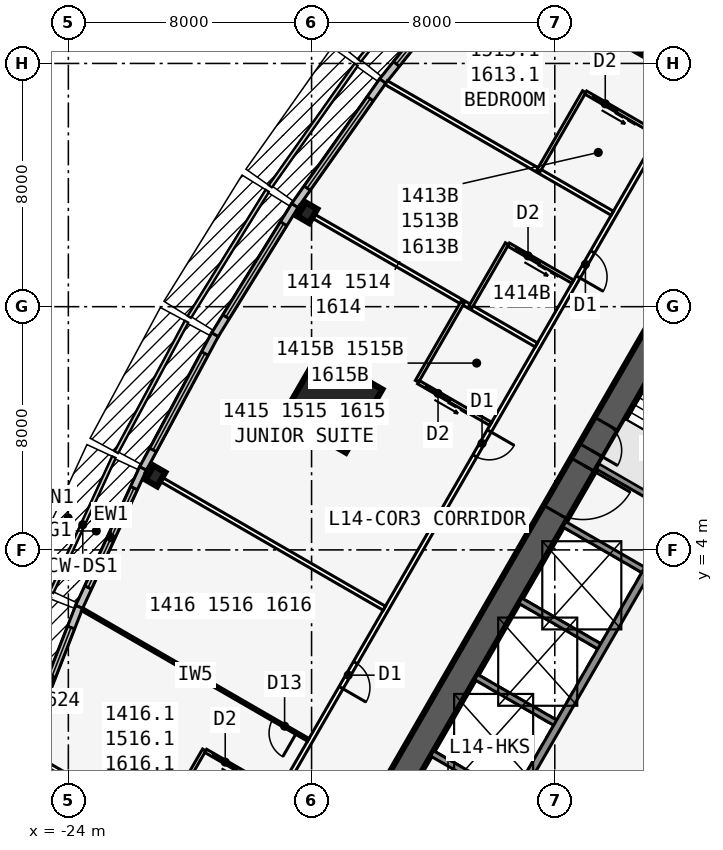
"""IFC4 building model, lengths in metres.
Left out: names, types, materials, properties, quantities, classifications, styles, units other than length and angle.
Written with IfcOpenShell. Run it as: python <this file> out.ifc"""

import sys

from ifc_helpers import new_model, si_unit, direction, frame, frame_2d, origin, origin_2d, place, context, subcontext, project, spatial, rectangle, i_section, extrude, element, fill, save


model = new_model("IFC4")
c1 = context("Model", 3, precision=1e-05, world=origin(), true_north=direction((0.0, 1.0)))
c2 = subcontext(c1, "Body", "Model", "MODEL_VIEW")
j1 = project(units=[si_unit("LENGTHUNIT", "METRE"), si_unit("PLANEANGLEUNIT", "RADIAN")], contexts=[c1])
p1 = place(None, origin())
s1 = spatial("IfcSite", under=j1, at=p1, CompositionType="ELEMENT")
p2 = place(p1, origin())
s2 = spatial("IfcBuilding", under=s1, at=p2, CompositionType="ELEMENT")
p3 = place(p2, frame((0.0, 0.0, 59.1)))
s3 = spatial("IfcBuildingStorey", under=s2, at=p3, CompositionType="ELEMENT", Elevation=59.1)
p4 = place(p3, frame((0.0, 19.052, 0.0), z_axis=(0.0, 0.0, 1.0), x_axis=(-0.499999749417, -0.866025548458, 0.0)))
e1 = element("IfcWall", 1, at=p4, inside=s3, PredefinedType="SHEAR", context=c2, shape_type="SweptSolid", body=[
    extrude(rectangle(XDim=33.0, YDim=0.9, at=frame_2d((16.5, 0.0))), origin(), (0.0, 0.0, 1.0), 3.4),
])
p5 = place(p4, frame((14.15, 0.0, 0.0)))
e2 = element("IfcOpeningElement", 2, at=p5, cuts=e1, PredefinedType="OPENING", context=c2, shape_type="SweptSolid", body=[
    extrude(rectangle(XDim=1.8, YDim=2.13, at=frame_2d((0.9, 1.065))), frame((0.0, 0.46, 0.0), z_axis=(0.0, -1.0, 0.0), x_axis=(1.0, 0.0, 0.0)), (0.0, 0.0, 1.0), 0.92),
])
p6 = place(p4, frame((12.6, 0.0, 0.0)))
e3 = element("IfcOpeningElement", 3, at=p6, cuts=e1, PredefinedType="OPENING", context=c2, shape_type="SweptSolid", body=[
    extrude(rectangle(XDim=1.0, YDim=2.13, at=frame_2d((0.5, 1.065))), frame((0.0, 0.46, 0.0), z_axis=(0.0, -1.0, 0.0), x_axis=(1.0, 0.0, 0.0)), (0.0, 0.0, 1.0), 0.92),
])
p7 = place(p3, frame((-4.929, 3.365, 0.0), z_axis=(0.0, 0.0, 1.0), x_axis=(-0.499991433582, -0.866030349552, 0.0)))
e4 = element("IfcWall", 4, at=p7, inside=s3, PredefinedType="SOLIDWALL", context=c2, shape_type="SweptSolid", body=[
    extrude(rectangle(XDim=10.633, YDim=0.25, at=frame_2d((5.316, 0.0))), origin(), (0.0, 0.0, 1.0), 3.235),
])
p8 = place(p7, frame((9.164, 0.0, 0.0)))
e5 = element("IfcOpeningElement", 5, at=p8, cuts=e4, PredefinedType="OPENING", context=c2, shape_type="SweptSolid", body=[
    extrude(rectangle(XDim=0.9, YDim=2.13, at=frame_2d((0.45, 1.065))), frame((0.0, 0.135, 0.0), z_axis=(0.0, -1.0, 0.0), x_axis=(1.0, 0.0, 0.0)), (0.0, 0.0, 1.0), 0.27),
])
for number, where, z_axis, x_axis in (
    (6, (-3.879, 5.184, 0.0), (0.0, 0.0, 1.0), (-0.866, 0.5, 0.0)),
    (7, (-4.979, 3.279, 0.0), (0.0, 0.0, 1.0), (-0.866, 0.5, 0.0)),
    (8, (-6.429, 0.767, 0.0), (0.0, 0.0, 1.0), (-0.866, 0.5, 0.0)),
    (9, (-7.879, -1.744, 0.0), (0.0, 0.0, 1.0), (-0.866, 0.5, 0.0)),
    (10, (-9.329, -4.256, 0.0), (0.0, 0.0, 1.0), (-0.866, 0.5, 0.0)),
):
    element("IfcWall", number, at=place(p3, frame(where, z_axis=z_axis, x_axis=x_axis)), inside=s3, PredefinedType="SOLIDWALL", context=c2, shape_type="SweptSolid", body=[
        extrude(rectangle(XDim=3.125, YDim=0.2, at=frame_2d((1.562, 0.0))), origin(), (0.0, 0.0, 1.0), 3.235),
    ])
for number, where, z_axis, x_axis in (
    (11, (-16.137, 15.09, 0.0), (0.0, 0.0, 1.0), (-0.866, 0.5, 0.0)),
    (12, (-21.137, 6.43, 0.0), (0.0, 0.0, 1.0), (-0.866, 0.5, 0.0)),
):
    element("IfcColumn", number, at=place(p3, frame(where, z_axis=z_axis, x_axis=x_axis)), inside=s3, PredefinedType="COLUMN", context=c2, shape_type="SweptSolid", body=[
        extrude(i_section(OverallWidth=0.442, OverallDepth=0.531, WebThickness=0.066, FlangeThickness=0.106, at=origin_2d()), origin(), (0.0, 0.0, 1.0), 3.4),
    ])
p9 = place(p3, frame((-15.312, 8.84, 0.0), z_axis=(0.0, 0.0, 1.0), x_axis=(-0.866025403784, 0.5, 0.0)))
e13 = element("IfcColumn", 13, at=p9, inside=s3, PredefinedType="COLUMN", context=c2, shape_type="SweptSolid", body=[
    extrude(rectangle(XDim=2.4, YDim=2.4, at=origin_2d()), origin(), (0.0, 0.0, 1.0), 3.4),
])
p10 = place(p3, frame((-10.505, 23.364, 0.0), z_axis=(0.0, 0.0, 1.0), x_axis=(-0.624594965756, -0.780948864364, 0.0)))
e14 = element("IfcWall", 14, at=p10, inside=s3, PredefinedType="STANDARD", context=c2, shape_type="SweptSolid", body=[
    extrude(rectangle(XDim=5.058, YDim=0.25, at=frame_2d((2.529, 0.0))), origin(), (0.0, 0.0, 1.0), 3.235),
])
p11 = place(p10, frame((0.729, 0.0, 0.45)))
e15 = element("IfcOpeningElement", 15, at=p11, cuts=e14, PredefinedType="OPENING", context=c2, shape_type="SweptSolid", body=[
    extrude(rectangle(XDim=3.6, YDim=2.4, at=frame_2d((1.8, 1.2))), frame((0.0, 0.135, 0.0), z_axis=(0.0, -1.0, 0.0), x_axis=(1.0, 0.0, 0.0)), (0.0, 0.0, 1.0), 0.27),
])
p12 = place(p3, frame((-13.659, 19.42, 0.0), z_axis=(0.0, 0.0, 1.0), x_axis=(-0.5766431066, -0.81699616132, 0.0)))
e16 = element("IfcWall", 16, at=p12, inside=s3, PredefinedType="STANDARD", context=c2, shape_type="SweptSolid", body=[
    extrude(rectangle(XDim=5.021, YDim=0.25, at=frame_2d((2.51, 0.0))), origin(), (0.0, 0.0, 1.0), 3.235),
])
p13 = place(p12, frame((0.71, 0.0, 0.45)))
e17 = element("IfcOpeningElement", 17, at=p13, cuts=e16, PredefinedType="OPENING", context=c2, shape_type="SweptSolid", body=[
    extrude(rectangle(XDim=3.6, YDim=2.4, at=frame_2d((1.8, 1.2))), frame((0.0, 0.135, 0.0), z_axis=(0.0, -1.0, 0.0), x_axis=(1.0, 0.0, 0.0)), (0.0, 0.0, 1.0), 0.27),
])
p14 = place(p3, frame((-16.551, 15.324, 0.0), z_axis=(0.0, 0.0, 1.0), x_axis=(-0.526132807704, -0.850402415717, 0.0)))
e18 = element("IfcWall", 18, at=p14, inside=s3, PredefinedType="STANDARD", context=c2, shape_type="SweptSolid", body=[
    extrude(rectangle(XDim=5.002, YDim=0.25, at=frame_2d((2.501, 0.0))), origin(), (0.0, 0.0, 1.0), 3.235),
])
p15 = place(p14, frame((0.701, 0.0, 0.45)))
e19 = element("IfcOpeningElement", 19, at=p15, cuts=e18, PredefinedType="OPENING", context=c2, shape_type="SweptSolid", body=[
    extrude(rectangle(XDim=3.6, YDim=2.4, at=frame_2d((1.8, 1.2))), frame((0.0, 0.135, 0.0), z_axis=(0.0, -1.0, 0.0), x_axis=(1.0, 0.0, 0.0)), (0.0, 0.0, 1.0), 0.27),
])
p16 = place(p3, frame((-19.178, 11.077, 0.0), z_axis=(0.0, 0.0, 1.0), x_axis=(-0.473412820489, -0.880840678782, 0.0)))
e20 = element("IfcWall", 20, at=p16, inside=s3, PredefinedType="STANDARD", context=c2, shape_type="SweptSolid", body=[
    extrude(rectangle(XDim=5.002, YDim=0.25, at=frame_2d((2.501, 0.0))), origin(), (0.0, 0.0, 1.0), 3.235),
])
p17 = place(p16, frame((0.701, 0.0, 0.45)))
e21 = element("IfcOpeningElement", 21, at=p17, cuts=e20, PredefinedType="OPENING", context=c2, shape_type="SweptSolid", body=[
    extrude(rectangle(XDim=3.6, YDim=2.4, at=frame_2d((1.8, 1.2))), frame((0.0, 0.135, 0.0), z_axis=(0.0, -1.0, 0.0), x_axis=(1.0, 0.0, 0.0)), (0.0, 0.0, 1.0), 0.27),
])
p18 = place(p3, frame((-21.543, 6.678, 0.0), z_axis=(0.0, 0.0, 1.0), x_axis=(-0.419203100754, -0.907892482796, 0.0)))
e22 = element("IfcWall", 22, at=p18, inside=s3, PredefinedType="STANDARD", context=c2, shape_type="SweptSolid", body=[
    extrude(rectangle(XDim=5.021, YDim=0.25, at=frame_2d((2.51, 0.0))), origin(), (0.0, 0.0, 1.0), 3.235),
])
p19 = place(p18, frame((0.71, 0.0, 0.45)))
e23 = element("IfcOpeningElement", 23, at=p19, cuts=e22, PredefinedType="OPENING", context=c2, shape_type="SweptSolid", body=[
    extrude(rectangle(XDim=3.6, YDim=2.4, at=frame_2d((1.8, 1.2))), frame((0.0, 0.135, 0.0), z_axis=(0.0, -1.0, 0.0), x_axis=(1.0, 0.0, 0.0)), (0.0, 0.0, 1.0), 0.27),
])
p20 = place(p3, frame((-23.645, 2.126, 0.0), z_axis=(0.0, 0.0, 1.0), x_axis=(-0.364013463868, -0.931393685894, 0.0)))
e24 = element("IfcWall", 24, at=p20, inside=s3, PredefinedType="STANDARD", context=c2, shape_type="SweptSolid", body=[
    extrude(rectangle(XDim=5.058, YDim=0.25, at=frame_2d((2.529, 0.0))), origin(), (0.0, 0.0, 1.0), 3.235),
])
p21 = place(p20, frame((0.729, 0.0, 0.45)))
e25 = element("IfcOpeningElement", 25, at=p21, cuts=e24, PredefinedType="OPENING", context=c2, shape_type="SweptSolid", body=[
    extrude(rectangle(XDim=3.6, YDim=2.4, at=frame_2d((1.8, 1.2))), frame((0.0, 0.135, 0.0), z_axis=(0.0, -1.0, 0.0), x_axis=(1.0, 0.0, 0.0)), (0.0, 0.0, 1.0), 0.27),
])
p22 = place(p3, frame((-0.5, 24.636, 0.0), z_axis=(0.0, 0.0, 1.0), x_axis=(-0.500001915564, -0.86602429783, 0.0)))
e26 = element("IfcWall", 26, at=p22, inside=s3, PredefinedType="PARTITIONING", context=c2, shape_type="SweptSolid", body=[
    extrude(rectangle(XDim=42.172, YDim=0.15, at=frame_2d((21.086, 0.0))), origin(), (0.0, 0.0, 1.0), 3.235),
])
p23 = place(p22, frame((2.338, 0.0, 0.0)))
e27 = element("IfcOpeningElement", 27, at=p23, cuts=e26, PredefinedType="OPENING", context=c2, shape_type="SweptSolid", body=[
    extrude(rectangle(XDim=0.95, YDim=2.13, at=frame_2d((0.475, 1.065))), frame((0.0, 0.085, 0.0), z_axis=(0.0, -1.0, 0.0), x_axis=(1.0, 0.0, 0.0)), (0.0, 0.0, 1.0), 0.17),
])
p24 = place(p22, frame((12.511, 0.0, 0.0)))
e28 = element("IfcOpeningElement", 28, at=p24, cuts=e26, PredefinedType="OPENING", context=c2, shape_type="SweptSolid", body=[
    extrude(rectangle(XDim=0.95, YDim=2.13, at=frame_2d((0.475, 1.065))), frame((0.0, 0.085, 0.0), z_axis=(0.0, -1.0, 0.0), x_axis=(1.0, 0.0, 0.0)), (0.0, 0.0, 1.0), 0.17),
])
p25 = place(p22, frame((19.311, 0.0, 0.0)))
e29 = element("IfcOpeningElement", 29, at=p25, cuts=e26, PredefinedType="OPENING", context=c2, shape_type="SweptSolid", body=[
    extrude(rectangle(XDim=0.95, YDim=2.13, at=frame_2d((0.475, 1.065))), frame((0.0, 0.085, 0.0), z_axis=(0.0, -1.0, 0.0), x_axis=(1.0, 0.0, 0.0)), (0.0, 0.0, 1.0), 0.17),
])
p26 = place(p22, frame((28.111, 0.0, 0.0)))
e30 = element("IfcOpeningElement", 30, at=p26, cuts=e26, PredefinedType="OPENING", context=c2, shape_type="SweptSolid", body=[
    extrude(rectangle(XDim=0.95, YDim=2.13, at=frame_2d((0.475, 1.065))), frame((0.0, 0.085, 0.0), z_axis=(0.0, -1.0, 0.0), x_axis=(1.0, 0.0, 0.0)), (0.0, 0.0, 1.0), 0.17),
])
p27 = place(p22, frame((39.311, 0.0, 0.0)))
e31 = element("IfcOpeningElement", 31, at=p27, cuts=e26, PredefinedType="OPENING", context=c2, shape_type="SweptSolid", body=[
    extrude(rectangle(XDim=0.95, YDim=2.13, at=frame_2d((0.475, 1.065))), frame((0.0, 0.085, 0.0), z_axis=(0.0, -1.0, 0.0), x_axis=(1.0, 0.0, 0.0)), (0.0, 0.0, 1.0), 0.17),
])
p28 = place(p3, frame((-3.608, 19.404, 0.0), z_axis=(0.0, 0.0, 1.0), x_axis=(-0.866021300503, 0.500007107024, 0.0)))
e32 = element("IfcWall", 32, at=p28, inside=s3, PredefinedType="PARTITIONING", context=c2, shape_type="SweptSolid", body=[
    extrude(rectangle(XDim=7.82, YDim=0.1, at=frame_2d((3.91, 0.0))), origin(), (0.0, 0.0, 1.0), 2.389),
])
p29 = place(p28, frame((0.45, 0.0, 0.0)))
e33 = element("IfcOpeningElement", 33, at=p29, cuts=e32, PredefinedType="OPENING", context=c2, shape_type="SweptSolid", body=[
    extrude(rectangle(XDim=0.9, YDim=2.13, at=frame_2d((0.45, 1.065))), frame((0.0, 0.06, 0.0), z_axis=(0.0, -1.0, 0.0), x_axis=(1.0, 0.0, 0.0)), (0.0, 0.0, 1.0), 0.12),
])
p30 = place(p3, frame((-6.108, 15.073, 0.0), z_axis=(0.0, 0.0, 1.0), x_axis=(-0.866031196456, 0.499989966665, 0.0)))
e34 = element("IfcWall", 34, at=p30, inside=s3, PredefinedType="PARTITIONING", context=c2, shape_type="SweptSolid", body=[
    extrude(rectangle(XDim=8.585, YDim=0.15, at=frame_2d((4.292, 0.0))), origin(), (0.0, 0.0, 1.0), 2.389),
])
for number, where, z_axis, x_axis in (
    (35, (-8.608, 10.743, 0.0), (0.0, 0.0, 1.0), (-0.866, 0.5, 0.0)),
    (36, (-13.608, 2.083, 0.0), (0.0, 0.0, 1.0), (-0.866, 0.5, 0.0)),
):
    element("IfcWall", number, at=place(p3, frame(where, z_axis=z_axis, x_axis=x_axis)), inside=s3, PredefinedType="PARTITIONING", context=c2, shape_type="SweptSolid", body=[
        extrude(rectangle(XDim=9.043, YDim=0.15, at=frame_2d((4.521, 0.0))), origin(), (0.0, 0.0, 1.0), 2.389),
    ])
p31 = place(p3, frame((-16.108, -2.247, 0.0), z_axis=(0.0, 0.0, 1.0), x_axis=(-0.866018881988, 0.500011295912, 0.0)))
e37 = element("IfcWall", 37, at=p31, inside=s3, PredefinedType="PARTITIONING", context=c2, shape_type="SweptSolid", body=[
    extrude(rectangle(XDim=8.585, YDim=0.1, at=frame_2d((4.292, 0.0))), origin(), (0.0, 0.0, 1.0), 2.389),
])
p32 = place(p31, frame((0.45, 0.0, 0.0)))
e38 = element("IfcOpeningElement", 38, at=p32, cuts=e37, PredefinedType="OPENING", context=c2, shape_type="SweptSolid", body=[
    extrude(rectangle(XDim=0.9, YDim=2.13, at=frame_2d((0.45, 1.065))), frame((0.0, 0.06, 0.0), z_axis=(0.0, -1.0, 0.0), x_axis=(1.0, 0.0, 0.0)), (0.0, 0.0, 1.0), 0.12),
])
p33 = place(p3, frame((-18.608, -6.577, 0.0), z_axis=(0.0, 0.0, 1.0), x_axis=(-0.866034818847, 0.499983692279, 0.0)))
e39 = element("IfcWall", 39, at=p33, inside=s3, PredefinedType="PARTITIONING", context=c2, shape_type="SweptSolid", body=[
    extrude(rectangle(XDim=7.82, YDim=0.15, at=frame_2d((3.91, 0.0))), origin(), (0.0, 0.0, 1.0), 2.389),
])
p34 = place(p3, frame((-7.033, 19.072, 0.0), z_axis=(0.0, 0.0, 1.0), x_axis=(-0.499990139034, -0.866031096941, 0.0)))
e40 = element("IfcWall", 40, at=p34, inside=s3, PredefinedType="PLUMBINGWALL", context=c2, shape_type="SweptSolid", body=[
    extrude(rectangle(XDim=3.0, YDim=0.12, at=frame_2d((1.5, 0.0))), origin(), (0.0, 0.0, 1.0), 3.235),
])
p35 = place(p3, frame((-4.608, 17.671, 0.0), z_axis=(0.0, 0.0, 1.0), x_axis=(-0.865997131366, 0.500048966069, 0.0)))
e41 = element("IfcWall", 41, at=p35, inside=s3, PredefinedType="PLUMBINGWALL", context=c2, shape_type="SweptSolid", body=[
    extrude(rectangle(XDim=2.74, YDim=0.12, at=frame_2d((1.37, 0.0))), origin(), (0.0, 0.0, 1.0), 3.235),
])
p36 = place(p35, frame((1.55, 0.0, 0.0)))
e42 = element("IfcOpeningElement", 42, at=p36, cuts=e41, PredefinedType="OPENING", context=c2, shape_type="SweptSolid", body=[
    extrude(rectangle(XDim=0.9, YDim=2.13, at=frame_2d((0.45, 1.065))), frame((0.0, 0.07, 0.0), z_axis=(0.0, -1.0, 0.0), x_axis=(1.0, 0.0, 0.0)), (0.0, 0.0, 1.0), 0.14),
])
p37 = place(p3, frame((-9.573, 14.072, 0.0), z_axis=(0.0, 0.0, 1.0), x_axis=(-0.500001309137, -0.866024647952, 0.0)))
e43 = element("IfcWall", 43, at=p37, inside=s3, PredefinedType="PLUMBINGWALL", context=c2, shape_type="SweptSolid", body=[
    extrude(rectangle(XDim=2.4, YDim=0.12, at=frame_2d((1.2, 0.0))), origin(), (0.0, 0.0, 1.0), 3.235),
])
p38 = place(p3, frame((-7.408, 12.822, 0.0), z_axis=(0.0, 0.0, 1.0), x_axis=(-0.866023955769, 0.500002508028, 0.0)))
e44 = element("IfcWall", 44, at=p38, inside=s3, PredefinedType="PLUMBINGWALL", context=c2, shape_type="SweptSolid", body=[
    extrude(rectangle(XDim=2.44, YDim=0.12, at=frame_2d((1.22, 0.0))), origin(), (0.0, 0.0, 1.0), 3.235),
])
p39 = place(p38, frame((1.25, 0.0, 0.0)))
e45 = element("IfcOpeningElement", 45, at=p39, cuts=e44, PredefinedType="OPENING", context=c2, shape_type="SweptSolid", body=[
    extrude(rectangle(XDim=0.9, YDim=2.13, at=frame_2d((0.45, 1.065))), frame((0.0, 0.07, 0.0), z_axis=(0.0, -1.0, 0.0), x_axis=(1.0, 0.0, 0.0)), (0.0, 0.0, 1.0), 0.14),
])
p40 = place(p3, frame((-11.033, 12.143, 0.0), z_axis=(0.0, 0.0, 1.0), x_axis=(-0.499990139034, -0.866031096941, 0.0)))
e46 = element("IfcWall", 46, at=p40, inside=s3, PredefinedType="PLUMBINGWALL", context=c2, shape_type="SweptSolid", body=[
    extrude(rectangle(XDim=3.0, YDim=0.12, at=frame_2d((1.5, 0.0))), origin(), (0.0, 0.0, 1.0), 3.235),
])
p41 = place(p3, frame((-10.108, 8.145, 0.0), z_axis=(0.0, 0.0, 1.0), x_axis=(-0.866035715982, 0.499982138324, 0.0)))
e47 = element("IfcWall", 47, at=p41, inside=s3, PredefinedType="PLUMBINGWALL", context=c2, shape_type="SweptSolid", body=[
    extrude(rectangle(XDim=2.74, YDim=0.12, at=frame_2d((1.37, 0.0))), origin(), (0.0, 0.0, 1.0), 3.235),
])
p42 = place(p41, frame((1.55, 0.0, 0.0)))
e48 = element("IfcOpeningElement", 48, at=p42, cuts=e47, PredefinedType="OPENING", context=c2, shape_type="SweptSolid", body=[
    extrude(rectangle(XDim=0.9, YDim=2.13, at=frame_2d((0.45, 1.065))), frame((0.0, 0.07, 0.0), z_axis=(0.0, -1.0, 0.0), x_axis=(1.0, 0.0, 0.0)), (0.0, 0.0, 1.0), 0.14),
])
p43 = place(p3, frame((-19.533, -2.579, 0.0), z_axis=(0.0, 0.0, 1.0), x_axis=(-0.499990139034, -0.866031096941, 0.0)))
e49 = element("IfcWall", 49, at=p43, inside=s3, PredefinedType="PLUMBINGWALL", context=c2, shape_type="SweptSolid", body=[
    extrude(rectangle(XDim=3.0, YDim=0.12, at=frame_2d((1.5, 0.0))), origin(), (0.0, 0.0, 1.0), 3.235),
])
p44 = place(p3, frame((-17.108, -3.979, 0.0), z_axis=(0.0, 0.0, 1.0), x_axis=(-0.865997131366, 0.500048966069, 0.0)))
e50 = element("IfcWall", 50, at=p44, inside=s3, PredefinedType="PLUMBINGWALL", context=c2, shape_type="SweptSolid", body=[
    extrude(rectangle(XDim=2.74, YDim=0.12, at=frame_2d((1.37, 0.0))), origin(), (0.0, 0.0, 1.0), 3.235),
])
p45 = place(p44, frame((1.55, 0.0, 0.0)))
e51 = element("IfcOpeningElement", 51, at=p45, cuts=e50, PredefinedType="OPENING", context=c2, shape_type="SweptSolid", body=[
    extrude(rectangle(XDim=0.9, YDim=2.13, at=frame_2d((0.45, 1.065))), frame((0.0, 0.07, 0.0), z_axis=(0.0, -1.0, 0.0), x_axis=(1.0, 0.0, 0.0)), (0.0, 0.0, 1.0), 0.14),
])
p46 = place(p11, origin())
e52 = element("IfcWindow", 52, at=p46, inside=s3, PartitioningType="SINGLE_PANEL", PredefinedType="WINDOW", context=c2, shape_type="SweptSolid", body=[
    extrude(rectangle(XDim=3.6, YDim=2.4, at=frame_2d((1.8, 1.2))), frame((0.0, 0.03, 0.0), z_axis=(0.0, -1.0, 0.0), x_axis=(1.0, 0.0, 0.0)), (0.0, 0.0, 1.0), 0.06),
])
fill(e15, e52)
p47 = place(p13, origin())
e53 = element("IfcWindow", 53, at=p47, inside=s3, PartitioningType="SINGLE_PANEL", PredefinedType="WINDOW", context=c2, shape_type="SweptSolid", body=[
    extrude(rectangle(XDim=3.6, YDim=2.4, at=frame_2d((1.8, 1.2))), frame((0.0, 0.03, 0.0), z_axis=(0.0, -1.0, 0.0), x_axis=(1.0, 0.0, 0.0)), (0.0, 0.0, 1.0), 0.06),
])
fill(e17, e53)
p48 = place(p15, origin())
e54 = element("IfcWindow", 54, at=p48, inside=s3, PartitioningType="SINGLE_PANEL", PredefinedType="WINDOW", context=c2, shape_type="SweptSolid", body=[
    extrude(rectangle(XDim=3.6, YDim=2.4, at=frame_2d((1.8, 1.2))), frame((0.0, 0.03, 0.0), z_axis=(0.0, -1.0, 0.0), x_axis=(1.0, 0.0, 0.0)), (0.0, 0.0, 1.0), 0.06),
])
fill(e19, e54)
p49 = place(p17, origin())
e55 = element("IfcWindow", 55, at=p49, inside=s3, PartitioningType="SINGLE_PANEL", PredefinedType="WINDOW", context=c2, shape_type="SweptSolid", body=[
    extrude(rectangle(XDim=3.6, YDim=2.4, at=frame_2d((1.8, 1.2))), frame((0.0, 0.03, 0.0), z_axis=(0.0, -1.0, 0.0), x_axis=(1.0, 0.0, 0.0)), (0.0, 0.0, 1.0), 0.06),
])
fill(e21, e55)
p50 = place(p19, origin())
e56 = element("IfcWindow", 56, at=p50, inside=s3, PartitioningType="SINGLE_PANEL", PredefinedType="WINDOW", context=c2, shape_type="SweptSolid", body=[
    extrude(rectangle(XDim=3.6, YDim=2.4, at=frame_2d((1.8, 1.2))), frame((0.0, 0.03, 0.0), z_axis=(0.0, -1.0, 0.0), x_axis=(1.0, 0.0, 0.0)), (0.0, 0.0, 1.0), 0.06),
])
fill(e23, e56)
p51 = place(p21, origin())
e57 = element("IfcWindow", 57, at=p51, inside=s3, PartitioningType="SINGLE_PANEL", PredefinedType="WINDOW", context=c2, shape_type="SweptSolid", body=[
    extrude(rectangle(XDim=3.6, YDim=2.4, at=frame_2d((1.8, 1.2))), frame((0.0, 0.03, 0.0), z_axis=(0.0, -1.0, 0.0), x_axis=(1.0, 0.0, 0.0)), (0.0, 0.0, 1.0), 0.06),
])
fill(e25, e57)
p52 = place(p32, origin())
e58 = element("IfcDoor", 58, at=p52, inside=s3, OperationType="SINGLE_SWING_LEFT", PredefinedType="DOOR", context=c2, shape_type="SweptSolid", body=[
    extrude(rectangle(XDim=0.9, YDim=2.13, at=frame_2d((0.45, 1.065))), frame((0.0, 0.025, 0.0), z_axis=(0.0, -1.0, 0.0), x_axis=(1.0, 0.0, 0.0)), (0.0, 0.0, 1.0), 0.05),
])
fill(e38, e58)
p53 = place(p36, origin())
e59 = element("IfcDoor", 59, at=p53, inside=s3, OperationType="SLIDING_TO_LEFT", PredefinedType="DOOR", context=c2, shape_type="SweptSolid", body=[
    extrude(rectangle(XDim=0.9, YDim=2.13, at=frame_2d((0.45, 1.065))), frame((0.0, 0.025, 0.0), z_axis=(0.0, -1.0, 0.0), x_axis=(1.0, 0.0, 0.0)), (0.0, 0.0, 1.0), 0.05),
])
fill(e42, e59)
p54 = place(p39, origin())
e60 = element("IfcDoor", 60, at=p54, inside=s3, OperationType="SLIDING_TO_LEFT", PredefinedType="DOOR", context=c2, shape_type="SweptSolid", body=[
    extrude(rectangle(XDim=0.9, YDim=2.13, at=frame_2d((0.45, 1.065))), frame((0.0, 0.025, 0.0), z_axis=(0.0, -1.0, 0.0), x_axis=(1.0, 0.0, 0.0)), (0.0, 0.0, 1.0), 0.05),
])
fill(e45, e60)
p55 = place(p24, origin())
e61 = element("IfcDoor", 61, at=p55, inside=s3, OperationType="SINGLE_SWING_RIGHT", PredefinedType="DOOR", context=c2, shape_type="SweptSolid", body=[
    extrude(rectangle(XDim=0.95, YDim=2.13, at=frame_2d((0.475, 1.065))), frame((0.0, 0.025, 0.0), z_axis=(0.0, -1.0, 0.0), x_axis=(1.0, 0.0, 0.0)), (0.0, 0.0, 1.0), 0.05),
])
fill(e28, e61)
p56 = place(p42, origin())
e62 = element("IfcDoor", 62, at=p56, inside=s3, OperationType="SLIDING_TO_LEFT", PredefinedType="DOOR", context=c2, shape_type="SweptSolid", body=[
    extrude(rectangle(XDim=0.9, YDim=2.13, at=frame_2d((0.45, 1.065))), frame((0.0, 0.025, 0.0), z_axis=(0.0, -1.0, 0.0), x_axis=(1.0, 0.0, 0.0)), (0.0, 0.0, 1.0), 0.05),
])
fill(e48, e62)
p57 = place(p25, origin())
e63 = element("IfcDoor", 63, at=p57, inside=s3, OperationType="SINGLE_SWING_LEFT", PredefinedType="DOOR", context=c2, shape_type="SweptSolid", body=[
    extrude(rectangle(XDim=0.95, YDim=2.13, at=frame_2d((0.475, 1.065))), frame((0.0, 0.025, 0.0), z_axis=(0.0, -1.0, 0.0), x_axis=(1.0, 0.0, 0.0)), (0.0, 0.0, 1.0), 0.05),
])
fill(e29, e63)
p58 = place(p26, origin())
e64 = element("IfcDoor", 64, at=p58, inside=s3, OperationType="SINGLE_SWING_RIGHT", PredefinedType="DOOR", context=c2, shape_type="SweptSolid", body=[
    extrude(rectangle(XDim=0.95, YDim=2.13, at=frame_2d((0.475, 1.065))), frame((0.0, 0.025, 0.0), z_axis=(0.0, -1.0, 0.0), x_axis=(1.0, 0.0, 0.0)), (0.0, 0.0, 1.0), 0.05),
])
fill(e30, e64)
p59 = place(p45, origin())
e65 = element("IfcDoor", 65, at=p59, inside=s3, OperationType="SLIDING_TO_LEFT", PredefinedType="DOOR", context=c2, shape_type="SweptSolid", body=[
    extrude(rectangle(XDim=0.9, YDim=2.13, at=frame_2d((0.45, 1.065))), frame((0.0, 0.025, 0.0), z_axis=(0.0, -1.0, 0.0), x_axis=(1.0, 0.0, 0.0)), (0.0, 0.0, 1.0), 0.05),
])
fill(e51, e65)
p60 = place(p5, origin())
e66 = element("IfcDoor", 66, at=p60, inside=s3, OperationType="DOUBLE_DOOR_SINGLE_SWING", PredefinedType="DOOR", context=c2, shape_type="SweptSolid", body=[
    extrude(rectangle(XDim=1.8, YDim=2.13, at=frame_2d((0.9, 1.065))), frame((0.0, 0.025, 0.0), z_axis=(0.0, -1.0, 0.0), x_axis=(1.0, 0.0, 0.0)), (0.0, 0.0, 1.0), 0.05),
])
fill(e2, e66)
p61 = place(p6, origin())
e67 = element("IfcDoor", 67, at=p61, inside=s3, OperationType="SINGLE_SWING_RIGHT", PredefinedType="DOOR", context=c2, shape_type="SweptSolid", body=[
    extrude(rectangle(XDim=1.0, YDim=2.13, at=frame_2d((0.5, 1.065))), frame((0.0, 0.025, 0.0), z_axis=(0.0, -1.0, 0.0), x_axis=(1.0, 0.0, 0.0)), (0.0, 0.0, 1.0), 0.05),
])
fill(e3, e67)
save(model, sys.argv[1])
